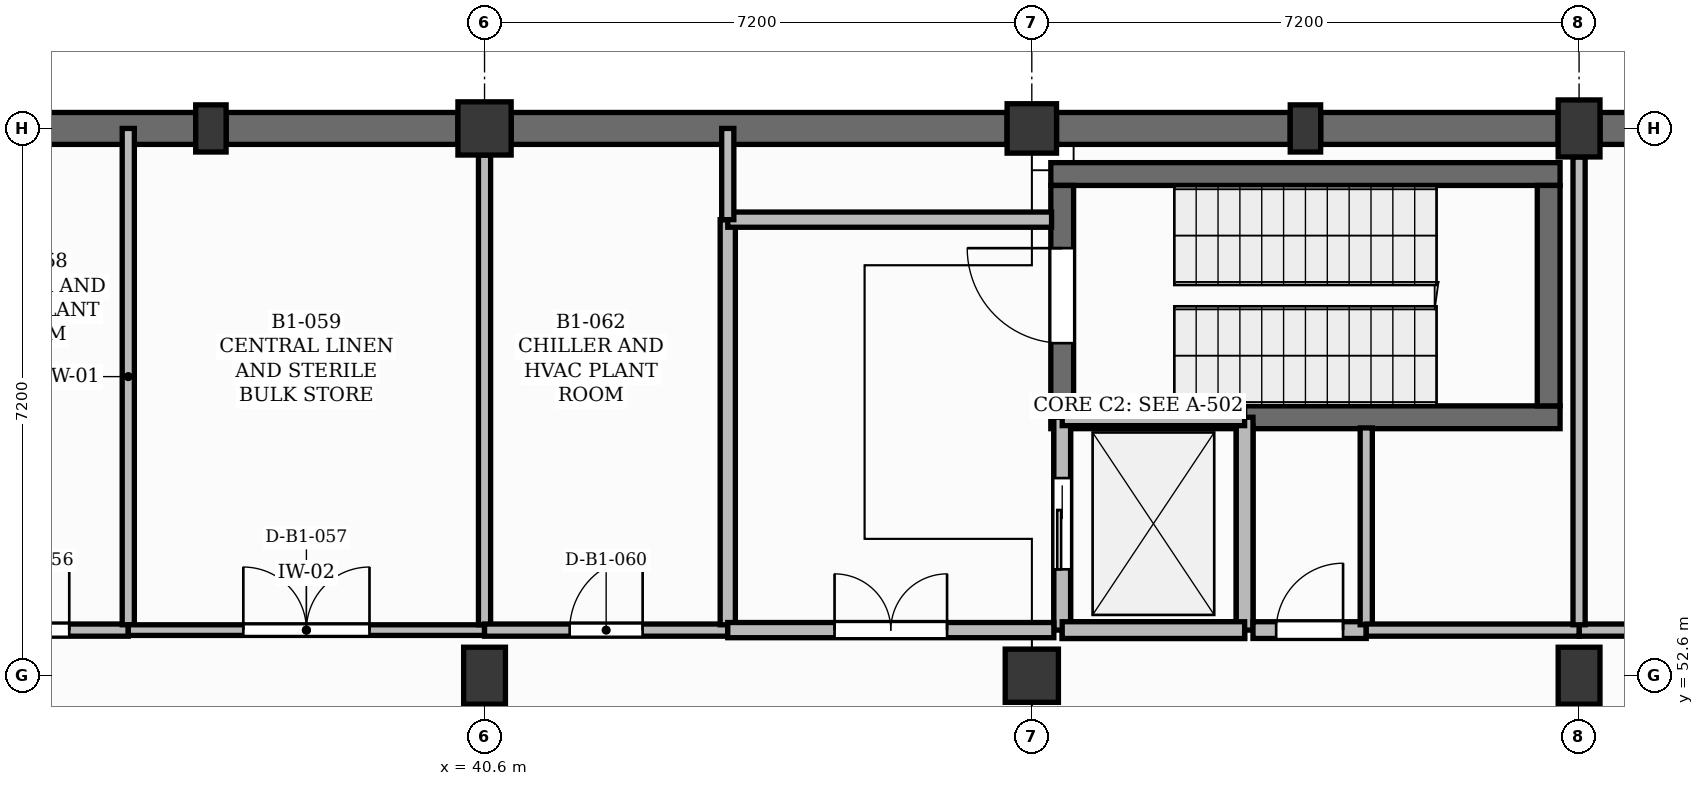
"""IFC4 building model, lengths in metres.
Left out: names, types, materials, properties, quantities, classifications, styles, units other than length and angle.
Written with IfcOpenShell. Run it as: python <this file> out.ifc"""

import sys

from ifc_helpers import new_model, si_unit, direction, frame, frame_2d, origin, origin_2d, place, context, subcontext, project, spatial, rectangle, extrude, element, fill, save


model = new_model("IFC4")
c1 = context("Model", 3, precision=1e-05, world=origin(), true_north=direction((0.0, 1.0)))
c2 = subcontext(c1, "Body", "Model", "MODEL_VIEW")
j1 = project(units=[si_unit("LENGTHUNIT", "METRE"), si_unit("PLANEANGLEUNIT", "RADIAN")], contexts=[c1])
p1 = place(None, origin())
s1 = spatial("IfcSite", under=j1, at=p1, CompositionType="ELEMENT")
p2 = place(p1, origin())
s2 = spatial("IfcBuilding", under=s1, at=p2, CompositionType="ELEMENT")
p3 = place(p2, frame((0.0, 0.0, -4.5)))
s3 = spatial("IfcBuildingStorey", under=s2, at=p3, CompositionType="ELEMENT", Elevation=-4.5)
p4 = place(p3, frame((40.6, 52.6, 0.0), z_axis=(0.0, 0.0, 1.0), x_axis=(1.0, 0.0, 0.0)))
e1 = element("IfcColumn", 1, at=p4, inside=s3, PredefinedType="COLUMN", context=c2, shape_type="SweptSolid", body=[
    extrude(rectangle(XDim=0.55, YDim=0.75, at=origin_2d()), origin(), (0.0, 0.0, 1.0), 4.2),
])
for number, where, z_axis, x_axis in (
    (2, (40.6, 59.8, 0.0), (0.0, 0.0, 1.0), (1.0, 0.0, 0.0)),
    (3, (47.8, 52.6, 0.0), (0.0, 0.0, 1.0), (1.0, 0.0, 0.0)),
):
    element("IfcColumn", number, at=place(p3, frame(where, z_axis=z_axis, x_axis=x_axis)), inside=s3, PredefinedType="COLUMN", context=c2, shape_type="SweptSolid", body=[
        extrude(rectangle(XDim=0.7, YDim=0.7, at=origin_2d()), origin(), (0.0, 0.0, 1.0), 4.2),
    ])
p5 = place(p3, frame((47.8, 59.8, 0.0), z_axis=(0.0, 0.0, 1.0), x_axis=(1.0, 0.0, 0.0)))
e4 = element("IfcColumn", 4, at=p5, inside=s3, PredefinedType="COLUMN", context=c2, shape_type="SweptSolid", body=[
    extrude(rectangle(XDim=0.65, YDim=0.65, at=origin_2d()), origin(), (0.0, 0.0, 1.0), 4.2),
])
for number, where, z_axis, x_axis in (
    (5, (55.0, 52.6, 0.0), (0.0, 0.0, 1.0), (1.0, 0.0, 0.0)),
    (6, (55.0, 59.8, 0.0), (0.0, 0.0, 1.0), (1.0, 0.0, 0.0)),
):
    element("IfcColumn", number, at=place(p3, frame(where, z_axis=z_axis, x_axis=x_axis)), inside=s3, PredefinedType="COLUMN", context=c2, shape_type="SweptSolid", body=[
        extrude(rectangle(XDim=0.55, YDim=0.75, at=origin_2d()), origin(), (0.0, 0.0, 1.0), 4.2),
    ])
for number, where, z_axis, x_axis in (
    (7, (37.0, 59.8, 0.0), (0.0, 0.0, 1.0), (1.0, 0.0, 0.0)),
    (8, (51.4, 59.8, 0.0), (0.0, 0.0, 1.0), (1.0, 0.0, 0.0)),
):
    element("IfcColumn", number, at=place(p3, frame(where, z_axis=z_axis, x_axis=x_axis)), inside=s3, PredefinedType="PILASTER", context=c2, shape_type="SweptSolid", body=[
        extrude(rectangle(XDim=0.4, YDim=0.62, at=origin_2d()), origin(), (0.0, 0.0, 1.0), 4.2),
    ])
p6 = place(p3, frame((33.725, 59.8, 0.0), z_axis=(0.0, 0.0, 1.0), x_axis=(1.0, 0.0, 0.0)))
e9 = element("IfcWall", 9, at=p6, inside=s3, PredefinedType="USERDEFINED", context=c2, shape_type="SweptSolid", body=[
    extrude(rectangle(XDim=3.075, YDim=0.42, at=frame_2d((1.538, 0.0))), origin(), (0.0, 0.0, 1.0), 4.2),
])
p7 = place(p3, frame((37.2, 59.8, 0.0), z_axis=(0.0, 0.0, 1.0), x_axis=(1.0, 0.0, 0.0)))
e10 = element("IfcWall", 10, at=p7, inside=s3, PredefinedType="USERDEFINED", context=c2, shape_type="SweptSolid", body=[
    extrude(rectangle(XDim=3.05, YDim=0.42, at=frame_2d((1.525, 0.0))), origin(), (0.0, 0.0, 1.0), 4.2),
])
p8 = place(p3, frame((40.95, 59.8, 0.0), z_axis=(0.0, 0.0, 1.0), x_axis=(1.0, 0.0, 0.0)))
e11 = element("IfcWall", 11, at=p8, inside=s3, PredefinedType="USERDEFINED", context=c2, shape_type="SweptSolid", body=[
    extrude(rectangle(XDim=6.525, YDim=0.42, at=frame_2d((3.263, 0.0))), origin(), (0.0, 0.0, 1.0), 4.2),
])
p9 = place(p3, frame((48.125, 59.8, 0.0), z_axis=(0.0, 0.0, 1.0), x_axis=(1.0, 0.0, 0.0)))
e12 = element("IfcWall", 12, at=p9, inside=s3, PredefinedType="USERDEFINED", context=c2, shape_type="SweptSolid", body=[
    extrude(rectangle(XDim=3.075, YDim=0.42, at=frame_2d((1.538, 0.0))), origin(), (0.0, 0.0, 1.0), 4.2),
])
p10 = place(p3, frame((51.6, 59.8, 0.0), z_axis=(0.0, 0.0, 1.0), x_axis=(1.0, 0.0, 0.0)))
e13 = element("IfcWall", 13, at=p10, inside=s3, PredefinedType="USERDEFINED", context=c2, shape_type="SweptSolid", body=[
    extrude(rectangle(XDim=3.125, YDim=0.42, at=frame_2d((1.562, 0.0))), origin(), (0.0, 0.0, 1.0), 4.2),
])
p11 = place(p3, frame((55.275, 59.8, 0.0), z_axis=(0.0, 0.0, 1.0), x_axis=(1.0, 0.0, 0.0)))
e14 = element("IfcWall", 14, at=p11, inside=s3, PredefinedType="USERDEFINED", context=c2, shape_type="SweptSolid", body=[
    extrude(rectangle(XDim=3.15, YDim=0.42, at=frame_2d((1.575, 0.0))), origin(), (0.0, 0.0, 1.0), 4.2),
])
for number, where, z_axis, x_axis in (
    (15, (48.05, 56.0, 0.0), (0.0, 0.0, 1.0), (1.0, 0.0, 0.0)),
    (16, (48.05, 59.2, 0.0), (0.0, 0.0, 1.0), (1.0, 0.0, 0.0)),
):
    element("IfcWall", number, at=place(p3, frame(where, z_axis=z_axis, x_axis=x_axis)), inside=s3, PredefinedType="SHEAR", context=c2, shape_type="SweptSolid", body=[
        extrude(rectangle(XDim=6.7, YDim=0.3, at=frame_2d((3.35, 0.0))), origin(), (0.0, 0.0, 1.0), 4.25),
    ])
p12 = place(p3, frame((48.2, 56.15, 0.0), z_axis=(0.0, 0.0, 1.0), x_axis=(0.0, 1.0, 0.0)))
e17 = element("IfcWall", 17, at=p12, inside=s3, PredefinedType="SHEAR", context=c2, shape_type="SweptSolid", body=[
    extrude(rectangle(XDim=2.9, YDim=0.3, at=frame_2d((1.45, 0.0))), origin(), (0.0, 0.0, 1.0), 4.25),
])
p13 = place(p12, frame((0.825, 0.0, 0.0)))
e18 = element("IfcOpeningElement", 18, at=p13, cuts=e17, PredefinedType="OPENING", context=c2, shape_type="SweptSolid", body=[
    extrude(rectangle(XDim=1.25, YDim=2.15, at=frame_2d((0.625, 1.075))), frame((0.0, 0.16, 0.0), z_axis=(0.0, -1.0, 0.0), x_axis=(1.0, 0.0, 0.0)), (0.0, 0.0, 1.0), 0.32),
])
p14 = place(p3, frame((54.6, 56.15, 0.0), z_axis=(0.0, 0.0, 1.0), x_axis=(0.0, 1.0, 0.0)))
e19 = element("IfcWall", 19, at=p14, inside=s3, PredefinedType="SHEAR", context=c2, shape_type="SweptSolid", body=[
    extrude(rectangle(XDim=2.9, YDim=0.3, at=frame_2d((1.45, 0.0))), origin(), (0.0, 0.0, 1.0), 4.25),
])
p15 = place(p3, frame((48.2, 53.2, 0.0), z_axis=(0.0, 0.0, 1.0), x_axis=(1.0, 0.0, 0.0)))
e20 = element("IfcWall", 20, at=p15, inside=s3, PredefinedType="SOLIDWALL", context=c2, shape_type="SweptSolid", body=[
    extrude(rectangle(XDim=2.4, YDim=0.22, at=frame_2d((1.2, 0.0))), origin(), (0.0, 0.0, 1.0), 4.25),
])
p16 = place(p3, frame((48.2, 53.31, 0.0), z_axis=(0.0, 0.0, 1.0), x_axis=(0.0, 1.0, 0.0)))
e21 = element("IfcWall", 21, at=p16, inside=s3, PredefinedType="SOLIDWALL", context=c2, shape_type="SweptSolid", body=[
    extrude(rectangle(XDim=2.58, YDim=0.22, at=frame_2d((1.29, 0.0))), origin(), (0.0, 0.0, 1.0), 4.25),
])
p17 = place(p16, frame((0.69, 0.0, 0.0)))
e22 = element("IfcOpeningElement", 22, at=p17, cuts=e21, PredefinedType="OPENING", context=c2, shape_type="SweptSolid", body=[
    extrude(rectangle(XDim=1.2, YDim=2.15, at=frame_2d((0.6, 1.075))), frame((0.0, 0.12, 0.0), z_axis=(0.0, -1.0, 0.0), x_axis=(1.0, 0.0, 0.0)), (0.0, 0.0, 1.0), 0.24),
])
p18 = place(p3, frame((50.6, 53.31, 0.0), z_axis=(0.0, 0.0, 1.0), x_axis=(0.0, 1.0, 0.0)))
e23 = element("IfcWall", 23, at=p18, inside=s3, PredefinedType="SOLIDWALL", context=c2, shape_type="SweptSolid", body=[
    extrude(rectangle(XDim=2.58, YDim=0.22, at=frame_2d((1.29, 0.0))), origin(), (0.0, 0.0, 1.0), 4.25),
])
for number, where, z_axis, x_axis in (
    (24, (48.2, 53.2, -0.9), (0.0, 0.0, 1.0), (0.0, 1.0, 0.0)),
    (25, (50.6, 53.2, -0.9), (0.0, 0.0, 1.0), (0.0, 1.0, 0.0)),
):
    element("IfcWall", number, at=place(p3, frame(where, z_axis=z_axis, x_axis=x_axis)), inside=s3, PredefinedType="SOLIDWALL", context=c2, shape_type="SweptSolid", body=[
        extrude(rectangle(XDim=2.8, YDim=0.22, at=frame_2d((1.4, 0.0))), origin(), (0.0, 0.0, 1.0), 0.9),
    ])
for number, where, z_axis, x_axis in (
    (26, (48.2, 53.2, -0.9), (0.0, 0.0, 1.0), (1.0, 0.0, 0.0)),
    (27, (48.2, 56.0, -0.9), (0.0, 0.0, 1.0), (1.0, 0.0, 0.0)),
):
    element("IfcWall", number, at=place(p3, frame(where, z_axis=z_axis, x_axis=x_axis)), inside=s3, PredefinedType="SOLIDWALL", context=c2, shape_type="SweptSolid", body=[
        extrude(rectangle(XDim=2.4, YDim=0.22, at=frame_2d((1.2, 0.0))), origin(), (0.0, 0.0, 1.0), 0.9),
    ])
p19 = place(p3, frame((33.4, 53.2, 0.0), z_axis=(0.0, 0.0, 1.0), x_axis=(1.0, 0.0, 0.0)))
e28 = element("IfcWall", 28, at=p19, inside=s3, PredefinedType="PARTITIONING", context=c2, shape_type="SweptSolid", body=[
    extrude(rectangle(XDim=2.513, YDim=0.16, at=frame_2d((1.257, 0.0))), origin(), (0.0, 0.0, 1.0), 4.08),
])
p20 = place(p19, frame((0.777, 0.0, 0.0)))
e29 = element("IfcOpeningElement", 29, at=p20, cuts=e28, PredefinedType="OPENING", context=c2, shape_type="SweptSolid", body=[
    extrude(rectangle(XDim=0.96, YDim=2.1, at=frame_2d((0.48, 1.05))), frame((0.0, 0.09, 0.0), z_axis=(0.0, -1.0, 0.0), x_axis=(1.0, 0.0, 0.0)), (0.0, 0.0, 1.0), 0.18),
])
p21 = place(p3, frame((35.913, 53.27, 0.0), z_axis=(0.0, 0.0, 1.0), x_axis=(0.0, 1.0, 0.0)))
e30 = element("IfcWall", 30, at=p21, inside=s3, PredefinedType="PARTITIONING", context=c2, shape_type="SweptSolid", body=[
    extrude(rectangle(XDim=6.53, YDim=0.16, at=frame_2d((3.265, 0.0))), origin(), (0.0, 0.0, 1.0), 4.08),
])
p22 = place(p3, frame((35.913, 53.2, 0.0), z_axis=(0.0, 0.0, 1.0), x_axis=(1.0, 0.0, 0.0)))
e31 = element("IfcWall", 31, at=p22, inside=s3, PredefinedType="PARTITIONING", context=c2, shape_type="SweptSolid", body=[
    extrude(rectangle(XDim=4.687, YDim=0.14, at=frame_2d((2.344, 0.0))), origin(), (0.0, 0.0, 1.0), 4.08),
])
p23 = place(p22, frame((1.513, 0.0, 0.0)))
e32 = element("IfcOpeningElement", 32, at=p23, cuts=e31, PredefinedType="OPENING", context=c2, shape_type="SweptSolid", body=[
    extrude(rectangle(XDim=1.66, YDim=2.3, at=frame_2d((0.83, 1.15))), frame((0.0, 0.08, 0.0), z_axis=(0.0, -1.0, 0.0), x_axis=(1.0, 0.0, 0.0)), (0.0, 0.0, 1.0), 0.16),
])
p24 = place(p3, frame((40.6, 53.27, 0.0), z_axis=(0.0, 0.0, 1.0), x_axis=(0.0, 1.0, 0.0)))
e33 = element("IfcWall", 33, at=p24, inside=s3, PredefinedType="PARTITIONING", context=c2, shape_type="SweptSolid", body=[
    extrude(rectangle(XDim=6.18, YDim=0.16, at=frame_2d((3.09, 0.0))), origin(), (0.0, 0.0, 1.0), 3.5),
])
p25 = place(p3, frame((40.6, 53.2, 0.0), z_axis=(0.0, 0.0, 1.0), x_axis=(1.0, 0.0, 0.0)))
e34 = element("IfcWall", 34, at=p25, inside=s3, PredefinedType="PARTITIONING", context=c2, shape_type="SweptSolid", body=[
    extrude(rectangle(XDim=3.2, YDim=0.16, at=frame_2d((1.6, 0.0))), origin(), (0.0, 0.0, 1.0), 4.08),
])
p26 = place(p25, frame((1.12, 0.0, 0.0)))
e35 = element("IfcOpeningElement", 35, at=p26, cuts=e34, PredefinedType="OPENING", context=c2, shape_type="SweptSolid", body=[
    extrude(rectangle(XDim=0.96, YDim=2.1, at=frame_2d((0.48, 1.05))), frame((0.0, 0.09, 0.0), z_axis=(0.0, -1.0, 0.0), x_axis=(1.0, 0.0, 0.0)), (0.0, 0.0, 1.0), 0.18),
])
p27 = place(p3, frame((43.8, 53.27, 0.0), z_axis=(0.0, 0.0, 1.0), x_axis=(0.0, 1.0, 0.0)))
e36 = element("IfcWall", 36, at=p27, inside=s3, PredefinedType="PARTITIONING", context=c2, shape_type="SweptSolid", body=[
    extrude(rectangle(XDim=5.33, YDim=0.2, at=frame_2d((2.665, 0.0))), origin(), (0.0, 0.0, 1.0), 4.08),
])
p28 = place(p3, frame((43.8, 53.2, 0.0), z_axis=(0.0, 0.0, 1.0), x_axis=(1.0, 0.0, 0.0)))
e37 = element("IfcWall", 37, at=p28, inside=s3, PredefinedType="PARTITIONING", context=c2, shape_type="SweptSolid", body=[
    extrude(rectangle(XDim=4.29, YDim=0.2, at=frame_2d((2.145, 0.0))), origin(), (0.0, 0.0, 1.0), 4.08),
])
p29 = place(p28, frame((1.405, 0.0, 0.0)))
e38 = element("IfcOpeningElement", 38, at=p29, cuts=e37, PredefinedType="OPENING", context=c2, shape_type="SweptSolid", body=[
    extrude(rectangle(XDim=1.48, YDim=2.25, at=frame_2d((0.74, 1.125))), frame((0.0, 0.11, 0.0), z_axis=(0.0, -1.0, 0.0), x_axis=(1.0, 0.0, 0.0)), (0.0, 0.0, 1.0), 0.22),
])
p30 = place(p3, frame((50.71, 53.2, 0.0), z_axis=(0.0, 0.0, 1.0), x_axis=(1.0, 0.0, 0.0)))
e39 = element("IfcWall", 39, at=p30, inside=s3, PredefinedType="SOLIDWALL", context=c2, shape_type="SweptSolid", body=[
    extrude(rectangle(XDim=1.49, YDim=0.22, at=frame_2d((0.745, 0.0))), origin(), (0.0, 0.0, 1.0), 4.08),
])
p31 = place(p30, frame((0.305, 0.0, 0.0)))
e40 = element("IfcOpeningElement", 40, at=p31, cuts=e39, PredefinedType="OPENING", context=c2, shape_type="SweptSolid", body=[
    extrude(rectangle(XDim=0.88, YDim=2.05, at=frame_2d((0.44, 1.025))), frame((0.0, 0.12, 0.0), z_axis=(0.0, -1.0, 0.0), x_axis=(1.0, 0.0, 0.0)), (0.0, 0.0, 1.0), 0.24),
])
p32 = place(p3, frame((55.0, 53.2, 0.0), z_axis=(0.0, 0.0, 1.0), x_axis=(1.0, 0.0, 0.0)))
e41 = element("IfcWall", 41, at=p32, inside=s3, PredefinedType="PARTITIONING", context=c2, shape_type="SweptSolid", body=[
    extrude(rectangle(XDim=7.2, YDim=0.16, at=frame_2d((3.6, 0.0))), origin(), (0.0, 0.0, 1.0), 4.08),
])
p33 = place(p32, frame((3.12, 0.0, 0.0)))
e42 = element("IfcOpeningElement", 42, at=p33, cuts=e41, PredefinedType="OPENING", context=c2, shape_type="SweptSolid", body=[
    extrude(rectangle(XDim=0.96, YDim=2.1, at=frame_2d((0.48, 1.05))), frame((0.0, 0.09, 0.0), z_axis=(0.0, -1.0, 0.0), x_axis=(1.0, 0.0, 0.0)), (0.0, 0.0, 1.0), 0.18),
])
p34 = place(p3, frame((52.2, 53.27, 0.0), z_axis=(0.0, 0.0, 1.0), x_axis=(0.0, 1.0, 0.0)))
e43 = element("IfcWall", 43, at=p34, inside=s3, PredefinedType="PARTITIONING", context=c2, shape_type="SweptSolid", body=[
    extrude(rectangle(XDim=2.59, YDim=0.16, at=frame_2d((1.295, 0.0))), origin(), (0.0, 0.0, 1.0), 4.08),
])
p35 = place(p3, frame((48.06, 58.6, 0.0), z_axis=(0.0, 0.0, 1.0), x_axis=(-1.0, 0.0, 0.0)))
e44 = element("IfcWall", 44, at=p35, inside=s3, PredefinedType="PARTITIONING", context=c2, shape_type="SweptSolid", body=[
    extrude(rectangle(XDim=4.26, YDim=0.2, at=frame_2d((2.13, 0.0))), origin(), (0.0, 0.0, 1.0), 4.08),
])
p36 = place(p3, frame((55.0, 53.2, 0.0), z_axis=(0.0, 0.0, 1.0), x_axis=(-1.0, 0.0, 0.0)))
e45 = element("IfcWall", 45, at=p36, inside=s3, PredefinedType="PARTITIONING", context=c2, shape_type="SweptSolid", body=[
    extrude(rectangle(XDim=2.8, YDim=0.16, at=frame_2d((1.4, 0.0))), origin(), (0.0, 0.0, 1.0), 4.08),
])
p37 = place(p3, frame((43.8, 58.6, 0.0), z_axis=(0.0, 0.0, 1.0), x_axis=(0.0, 1.0, 0.0)))
e46 = element("IfcWall", 46, at=p37, inside=s3, PredefinedType="PARTITIONING", context=c2, shape_type="SweptSolid", body=[
    extrude(rectangle(XDim=1.2, YDim=0.16, at=frame_2d((0.6, 0.0))), origin(), (0.0, 0.0, 1.0), 4.08),
])
p38 = place(p3, frame((55.0, 53.27, 0.0), z_axis=(0.0, 0.0, 1.0), x_axis=(0.0, 1.0, 0.0)))
e47 = element("IfcWall", 47, at=p38, inside=s3, PredefinedType="PARTITIONING", context=c2, shape_type="SweptSolid", body=[
    extrude(rectangle(XDim=6.155, YDim=0.16, at=frame_2d((3.078, 0.0))), origin(), (0.0, 0.0, 1.0), 3.5),
])
p39 = place(p17, origin())
e48 = element("IfcDoor", 48, at=p39, inside=s3, OperationType="SLIDING_TO_LEFT", PredefinedType="DOOR", context=c2, shape_type="SweptSolid", body=[
    extrude(rectangle(XDim=1.2, YDim=2.15, at=frame_2d((0.6, 1.075))), frame((0.0, 0.025, 0.0), z_axis=(0.0, -1.0, 0.0), x_axis=(1.0, 0.0, 0.0)), (0.0, 0.0, 1.0), 0.05),
])
fill(e22, e48)
p40 = place(p13, origin())
e49 = element("IfcDoor", 49, at=p40, inside=s3, OperationType="SINGLE_SWING_RIGHT", PredefinedType="DOOR", context=c2, shape_type="SweptSolid", body=[
    extrude(rectangle(XDim=1.25, YDim=2.15, at=frame_2d((0.625, 1.075))), frame((0.0, 0.025, 0.0), z_axis=(0.0, -1.0, 0.0), x_axis=(1.0, 0.0, 0.0)), (0.0, 0.0, 1.0), 0.05),
])
fill(e18, e49)
p41 = place(p29, origin())
e50 = element("IfcDoor", 50, at=p41, inside=s3, OperationType="DOUBLE_DOOR_SINGLE_SWING", PredefinedType="DOOR", context=c2, shape_type="SweptSolid", body=[
    extrude(rectangle(XDim=1.48, YDim=2.25, at=frame_2d((0.74, 1.125))), frame((0.0, 0.025, 0.0), z_axis=(0.0, -1.0, 0.0), x_axis=(1.0, 0.0, 0.0)), (0.0, 0.0, 1.0), 0.05),
])
fill(e38, e50)
p42 = place(p31, origin())
e51 = element("IfcDoor", 51, at=p42, inside=s3, OperationType="SINGLE_SWING_RIGHT", PredefinedType="DOOR", context=c2, shape_type="SweptSolid", body=[
    extrude(rectangle(XDim=0.88, YDim=2.05, at=frame_2d((0.44, 1.025))), frame((0.0, 0.025, 0.0), z_axis=(0.0, -1.0, 0.0), x_axis=(1.0, 0.0, 0.0)), (0.0, 0.0, 1.0), 0.05),
])
fill(e40, e51)
p43 = place(p20, origin())
e52 = element("IfcDoor", 52, at=p43, inside=s3, OperationType="SINGLE_SWING_RIGHT", PredefinedType="DOOR", context=c2, shape_type="SweptSolid", body=[
    extrude(rectangle(XDim=0.96, YDim=2.1, at=frame_2d((0.48, 1.05))), frame((0.0, 0.025, 0.0), z_axis=(0.0, -1.0, 0.0), x_axis=(1.0, 0.0, 0.0)), (0.0, 0.0, 1.0), 0.05),
])
fill(e29, e52)
p44 = place(p23, origin())
e53 = element("IfcDoor", 53, at=p44, inside=s3, OperationType="DOUBLE_DOOR_SINGLE_SWING", PredefinedType="DOOR", context=c2, shape_type="SweptSolid", body=[
    extrude(rectangle(XDim=1.66, YDim=2.3, at=frame_2d((0.83, 1.15))), frame((0.0, 0.025, 0.0), z_axis=(0.0, -1.0, 0.0), x_axis=(1.0, 0.0, 0.0)), (0.0, 0.0, 1.0), 0.05),
])
fill(e32, e53)
p45 = place(p26, origin())
e54 = element("IfcDoor", 54, at=p45, inside=s3, OperationType="SINGLE_SWING_RIGHT", PredefinedType="DOOR", context=c2, shape_type="SweptSolid", body=[
    extrude(rectangle(XDim=0.96, YDim=2.1, at=frame_2d((0.48, 1.05))), frame((0.0, 0.025, 0.0), z_axis=(0.0, -1.0, 0.0), x_axis=(1.0, 0.0, 0.0)), (0.0, 0.0, 1.0), 0.05),
])
fill(e35, e54)
save(model, sys.argv[1])
